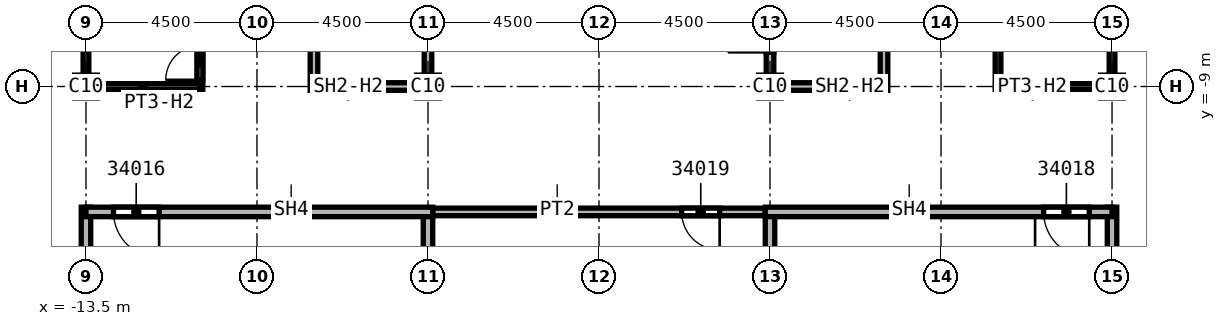
"""IFC4 building model, lengths in metres.
Left out: names, types, materials, properties, quantities, classifications, styles, units other than length and angle.
Written with IfcOpenShell. Run it as: python <this file> out.ifc"""

import sys

from ifc_helpers import new_model, si_unit, direction, frame, frame_2d, origin, origin_2d, place, context, subcontext, project, spatial, rectangle, extrude, element, fill, save


model = new_model("IFC4")
c1 = context("Model", 3, precision=1e-05, world=origin(), true_north=direction((0.0, 1.0)))
c2 = subcontext(c1, "Body", "Model", "MODEL_VIEW")
j1 = project(units=[si_unit("LENGTHUNIT", "METRE"), si_unit("PLANEANGLEUNIT", "RADIAN")], contexts=[c1])
p1 = place(None, origin())
s1 = spatial("IfcSite", under=j1, at=p1, CompositionType="ELEMENT")
p2 = place(p1, origin())
s2 = spatial("IfcBuilding", under=s1, at=p2, CompositionType="ELEMENT")
p3 = place(p2, frame((0.0, 0.0, 366.0)))
s3 = spatial("IfcBuildingStorey", under=s2, at=p3, CompositionType="ELEMENT", Elevation=366.0)
for number, where, z_axis, x_axis in (
    (1, (4.5, -9.0, 0.0), (0.0, 0.0, 1.0), (1.0, 0.0, 0.0)),
    (2, (13.5, -9.0, 0.0), (0.0, 0.0, 1.0), (1.0, 0.0, 0.0)),
    (3, (-4.5, -9.0, 0.0), (0.0, 0.0, 1.0), (1.0, 0.0, 0.0)),
    (4, (-13.5, -9.0, 0.0), (0.0, 0.0, 1.0), (1.0, 0.0, 0.0)),
):
    element("IfcColumn", number, at=place(p3, frame(where, z_axis=z_axis, x_axis=x_axis)), inside=s3, PredefinedType="COLUMN", context=c2, shape_type="SweptSolid", body=[
        extrude(rectangle(XDim=0.6, YDim=0.6, at=origin_2d()), origin(), (0.0, 0.0, 1.0), 9.6),
    ])
p4 = place(p3, frame((4.625, -12.3, 0.0), z_axis=(0.0, 0.0, 1.0), x_axis=(-1.0, 0.0, 0.0)))
e5 = element("IfcWall", 5, at=p4, inside=s3, PredefinedType="PARTITIONING", context=c2, shape_type="SweptSolid", body=[
    extrude(rectangle(XDim=9.25, YDim=0.2, at=frame_2d((4.625, 0.0))), origin(), (0.0, 0.0, 1.0), 9.15),
])
p5 = place(p4, frame((1.45, 0.0, 0.0)))
e6 = element("IfcOpeningElement", 6, at=p5, cuts=e5, PredefinedType="OPENING", context=c2, shape_type="SweptSolid", body=[
    extrude(rectangle(XDim=1.0, YDim=2.1, at=frame_2d((0.5, 1.05))), frame((0.0, 0.1, 0.0), z_axis=(0.0, -1.0, 0.0), x_axis=(1.0, 0.0, 0.0)), (0.0, 0.0, 1.0), 0.2),
])
p6 = place(p3, frame((-7.5, -9.1, 0.0), z_axis=(0.0, 0.0, 1.0), x_axis=(0.0, 1.0, 0.0)))
e7 = element("IfcWall", 7, at=p6, inside=s3, PredefinedType="SOLIDWALL", context=c2, shape_type="SweptSolid", body=[
    extrude(rectangle(XDim=6.225, YDim=0.2, at=frame_2d((3.113, 0.0))), origin(), (0.0, 0.0, 1.0), 9.15),
])
p7 = place(p3, frame((-4.5, -9.0, 0.0), z_axis=(0.0, 0.0, 1.0), x_axis=(-1.0, 0.0, 0.0)))
e8 = element("IfcWall", 8, at=p7, inside=s3, PredefinedType="SOLIDWALL", context=c2, shape_type="SweptSolid", body=[
    extrude(rectangle(XDim=3.0, YDim=0.2, at=frame_2d((1.5, 0.0))), origin(), (0.0, 0.0, 1.0), 8.754),
])
p8 = place(p3, frame((-4.5, 9.1, 0.0), z_axis=(0.0, 0.0, 1.0), x_axis=(0.0, -1.0, 0.0)))
e9 = element("IfcWall", 9, at=p8, inside=s3, PredefinedType="SOLIDWALL", context=c2, shape_type="SweptSolid", body=[
    extrude(rectangle(XDim=18.2, YDim=0.2, at=frame_2d((9.1, 0.0))), origin(), (0.0, 0.0, 1.0), 8.838),
])
p9 = place(p8, frame((15.35, 0.0, 0.0)))
e10 = element("IfcOpeningElement", 10, at=p9, cuts=e9, PredefinedType="OPENING", context=c2, shape_type="SweptSolid", body=[
    extrude(rectangle(XDim=1.1, YDim=2.1, at=frame_2d((0.55, 1.05))), frame((0.0, 0.1, 0.0), z_axis=(0.0, -1.0, 0.0), x_axis=(1.0, 0.0, 0.0)), (0.0, 0.0, 1.0), 0.2),
])
p10 = place(p8, frame((9.85, 0.0, 0.0)))
e11 = element("IfcOpeningElement", 11, at=p10, cuts=e9, PredefinedType="OPENING", context=c2, shape_type="SweptSolid", body=[
    extrude(rectangle(XDim=1.1, YDim=2.1, at=frame_2d((0.55, 1.05))), frame((0.0, 0.1, 0.0), z_axis=(0.0, -1.0, 0.0), x_axis=(1.0, 0.0, 0.0)), (0.0, 0.0, 1.0), 0.2),
])
p11 = place(p3, frame((4.5, -9.1, 0.0), z_axis=(0.0, 0.0, 1.0), x_axis=(0.0, 1.0, 0.0)))
e12 = element("IfcWall", 12, at=p11, inside=s3, PredefinedType="SOLIDWALL", context=c2, shape_type="SweptSolid", body=[
    extrude(rectangle(XDim=18.2, YDim=0.2, at=frame_2d((9.1, 0.0))), origin(), (0.0, 0.0, 1.0), 8.838),
])
p12 = place(p11, frame((1.0, 0.0, 0.0)))
e13 = element("IfcOpeningElement", 13, at=p12, cuts=e12, PredefinedType="OPENING", context=c2, shape_type="SweptSolid", body=[
    extrude(rectangle(XDim=1.1, YDim=2.1, at=frame_2d((0.55, 1.05))), frame((0.0, 0.1, 0.0), z_axis=(0.0, -1.0, 0.0), x_axis=(1.0, 0.0, 0.0)), (0.0, 0.0, 1.0), 0.2),
])
p13 = place(p11, frame((9.95, 0.0, 0.0)))
e14 = element("IfcOpeningElement", 14, at=p13, cuts=e12, PredefinedType="OPENING", context=c2, shape_type="SweptSolid", body=[
    extrude(rectangle(XDim=1.1, YDim=2.1, at=frame_2d((0.55, 1.05))), frame((0.0, 0.1, 0.0), z_axis=(0.0, -1.0, 0.0), x_axis=(1.0, 0.0, 0.0)), (0.0, 0.0, 1.0), 0.2),
])
p14 = place(p3, frame((7.5, -9.0, 0.0), z_axis=(0.0, 0.0, 1.0), x_axis=(-1.0, 0.0, 0.0)))
e15 = element("IfcWall", 15, at=p14, inside=s3, PredefinedType="SOLIDWALL", context=c2, shape_type="SweptSolid", body=[
    extrude(rectangle(XDim=3.0, YDim=0.2, at=frame_2d((1.5, 0.0))), origin(), (0.0, 0.0, 1.0), 8.754),
])
p15 = place(p3, frame((7.5, -2.875, 0.0), z_axis=(0.0, 0.0, 1.0), x_axis=(0.0, -1.0, 0.0)))
e16 = element("IfcWall", 16, at=p15, inside=s3, PredefinedType="SOLIDWALL", context=c2, shape_type="SweptSolid", body=[
    extrude(rectangle(XDim=6.225, YDim=0.2, at=frame_2d((3.113, 0.0))), origin(), (0.0, 0.0, 1.0), 9.15),
])
p16 = place(p3, frame((-13.5, -12.175, 0.0), z_axis=(0.0, 0.0, 1.0), x_axis=(0.0, -1.0, 0.0)))
e17 = element("IfcWall", 17, at=p16, inside=s3, PredefinedType="SOLIDWALL", context=c2, shape_type="SweptSolid", body=[
    extrude(rectangle(XDim=4.75, YDim=0.25, at=frame_2d((2.375, 0.0))), origin(), (0.0, 0.0, 1.0), 5.76),
])
p17 = place(p3, frame((-4.5, -12.3, 0.0), z_axis=(0.0, 0.0, 1.0), x_axis=(0.0, -1.0, 0.0)))
e18 = element("IfcWall", 18, at=p17, inside=s3, PredefinedType="SOLIDWALL", context=c2, shape_type="SweptSolid", body=[
    extrude(rectangle(XDim=4.625, YDim=0.25, at=frame_2d((2.312, 0.0))), origin(), (0.0, 0.0, 1.0), 9.744),
])
p18 = place(p3, frame((-4.375, -12.3, 0.0), z_axis=(0.0, 0.0, 1.0), x_axis=(-1.0, 0.0, 0.0)))
e19 = element("IfcWall", 19, at=p18, inside=s3, PredefinedType="SOLIDWALL", context=c2, shape_type="SweptSolid", body=[
    extrude(rectangle(XDim=9.125, YDim=0.25, at=frame_2d((4.562, 0.0))), origin(), (0.0, 0.0, 1.0), 9.15),
])
p19 = place(p18, frame((7.2, 0.0, 0.0)))
e20 = element("IfcOpeningElement", 20, at=p19, cuts=e19, PredefinedType="OPENING", context=c2, shape_type="SweptSolid", body=[
    extrude(rectangle(XDim=1.2, YDim=2.1, at=frame_2d((0.6, 1.05))), frame((0.0, 0.125, 0.0), z_axis=(0.0, -1.0, 0.0), x_axis=(1.0, 0.0, 0.0)), (0.0, 0.0, 1.0), 0.25),
])
p20 = place(p3, frame((4.5, -16.925, 0.0), z_axis=(0.0, 0.0, 1.0), x_axis=(0.0, 1.0, 0.0)))
e21 = element("IfcWall", 21, at=p20, inside=s3, PredefinedType="SOLIDWALL", context=c2, shape_type="SweptSolid", body=[
    extrude(rectangle(XDim=4.625, YDim=0.25, at=frame_2d((2.312, 0.0))), origin(), (0.0, 0.0, 1.0), 9.744),
])
p21 = place(p3, frame((13.5, -16.925, 0.0), z_axis=(0.0, 0.0, 1.0), x_axis=(0.0, 1.0, 0.0)))
e22 = element("IfcWall", 22, at=p21, inside=s3, PredefinedType="SOLIDWALL", context=c2, shape_type="SweptSolid", body=[
    extrude(rectangle(XDim=4.75, YDim=0.25, at=frame_2d((2.375, 0.0))), origin(), (0.0, 0.0, 1.0), 5.76),
])
p22 = place(p3, frame((13.5, -12.3, 0.0), z_axis=(0.0, 0.0, 1.0), x_axis=(-1.0, 0.0, 0.0)))
e23 = element("IfcWall", 23, at=p22, inside=s3, PredefinedType="SOLIDWALL", context=c2, shape_type="SweptSolid", body=[
    extrude(rectangle(XDim=9.125, YDim=0.25, at=frame_2d((4.562, 0.0))), origin(), (0.0, 0.0, 1.0), 9.15),
])
p23 = place(p22, frame((0.6, 0.0, 0.0)))
e24 = element("IfcOpeningElement", 24, at=p23, cuts=e23, PredefinedType="OPENING", context=c2, shape_type="SweptSolid", body=[
    extrude(rectangle(XDim=1.2, YDim=2.1, at=frame_2d((0.6, 1.05))), frame((0.0, 0.125, 0.0), z_axis=(0.0, -1.0, 0.0), x_axis=(1.0, 0.0, 0.0)), (0.0, 0.0, 1.0), 0.25),
])
p24 = place(p3, frame((-13.5, -9.075, 0.0), z_axis=(0.0, 0.0, 1.0), x_axis=(0.0, 1.0, 0.0)))
e25 = element("IfcWall", 25, at=p24, inside=s3, PredefinedType="PARTITIONING", context=c2, shape_type="SweptSolid", body=[
    extrude(rectangle(XDim=4.075, YDim=0.15, at=frame_2d((2.038, 0.0))), origin(), (0.0, 0.0, 1.0), 5.76),
])
p25 = place(p3, frame((-10.5, -9.075, 0.0), z_axis=(0.0, 0.0, 1.0), x_axis=(0.0, 1.0, 0.0)))
e26 = element("IfcWall", 26, at=p25, inside=s3, PredefinedType="PARTITIONING", context=c2, shape_type="SweptSolid", body=[
    extrude(rectangle(XDim=4.15, YDim=0.15, at=frame_2d((2.075, 0.0))), origin(), (0.0, 0.0, 1.0), 9.15),
])
p26 = place(p25, frame((0.25, 0.0, 0.0)))
e27 = element("IfcOpeningElement", 27, at=p26, cuts=e26, PredefinedType="OPENING", context=c2, shape_type="SweptSolid", body=[
    extrude(rectangle(XDim=0.9, YDim=2.1, at=frame_2d((0.45, 1.05))), frame((0.0, 0.075, 0.0), z_axis=(0.0, -1.0, 0.0), x_axis=(1.0, 0.0, 0.0)), (0.0, 0.0, 1.0), 0.15),
])
p27 = place(p3, frame((-10.5, -9.0, 0.0), z_axis=(0.0, 0.0, 1.0), x_axis=(-1.0, 0.0, 0.0)))
e28 = element("IfcWall", 28, at=p27, inside=s3, PredefinedType="PARTITIONING", context=c2, shape_type="SweptSolid", body=[
    extrude(rectangle(XDim=3.0, YDim=0.15, at=frame_2d((1.5, 0.0))), origin(), (0.0, 0.0, 1.0), 8.754),
])
p28 = place(p3, frame((10.5, -2.875, 0.0), z_axis=(0.0, 0.0, 1.0), x_axis=(0.0, -1.0, 0.0)))
e29 = element("IfcWall", 29, at=p28, inside=s3, PredefinedType="PARTITIONING", context=c2, shape_type="SweptSolid", body=[
    extrude(rectangle(XDim=6.2, YDim=0.15, at=frame_2d((3.1, 0.0))), origin(), (0.0, 0.0, 1.0), 9.15),
])
p29 = place(p28, frame((2.65, 0.0, 0.0)))
e30 = element("IfcOpeningElement", 30, at=p29, cuts=e29, PredefinedType="OPENING", context=c2, shape_type="SweptSolid", body=[
    extrude(rectangle(XDim=0.9, YDim=2.1, at=frame_2d((0.45, 1.05))), frame((0.0, 0.075, 0.0), z_axis=(0.0, -1.0, 0.0), x_axis=(1.0, 0.0, 0.0)), (0.0, 0.0, 1.0), 0.15),
])
p30 = place(p3, frame((13.5, -9.0, 0.0), z_axis=(0.0, 0.0, 1.0), x_axis=(-1.0, 0.0, 0.0)))
e31 = element("IfcWall", 31, at=p30, inside=s3, PredefinedType="PARTITIONING", context=c2, shape_type="SweptSolid", body=[
    extrude(rectangle(XDim=3.0, YDim=0.15, at=frame_2d((1.5, 0.0))), origin(), (0.0, 0.0, 1.0), 8.754),
])
p31 = place(p3, frame((13.5, -3.0, 0.0), z_axis=(0.0, 0.0, 1.0), x_axis=(0.0, -1.0, 0.0)))
e32 = element("IfcWall", 32, at=p31, inside=s3, PredefinedType="PARTITIONING", context=c2, shape_type="SweptSolid", body=[
    extrude(rectangle(XDim=6.075, YDim=0.15, at=frame_2d((3.038, 0.0))), origin(), (0.0, 0.0, 1.0), 5.76),
])
p32 = place(p26, origin())
e33 = element("IfcDoor", 33, at=p32, inside=s3, OperationType="SINGLE_SWING_RIGHT", PredefinedType="DOOR", context=c2, shape_type="SweptSolid", body=[
    extrude(rectangle(XDim=0.9, YDim=2.1, at=frame_2d((0.45, 1.05))), frame((0.0, 0.025, 0.0), z_axis=(0.0, -1.0, 0.0), x_axis=(1.0, 0.0, 0.0)), (0.0, 0.0, 1.0), 0.05),
])
fill(e27, e33)
p33 = place(p19, origin())
e34 = element("IfcDoor", 34, at=p33, inside=s3, OperationType="SINGLE_SWING_LEFT", PredefinedType="DOOR", context=c2, shape_type="SweptSolid", body=[
    extrude(rectangle(XDim=1.2, YDim=2.1, at=frame_2d((0.6, 1.05))), frame((0.0, 0.025, 0.0), z_axis=(0.0, -1.0, 0.0), x_axis=(1.0, 0.0, 0.0)), (0.0, 0.0, 1.0), 0.05),
])
fill(e20, e34)
p34 = place(p23, origin())
e35 = element("IfcDoor", 35, at=p34, inside=s3, OperationType="SINGLE_SWING_LEFT", PredefinedType="DOOR", context=c2, shape_type="SweptSolid", body=[
    extrude(rectangle(XDim=1.2, YDim=2.1, at=frame_2d((0.6, 1.05))), frame((0.0, 0.025, 0.0), z_axis=(0.0, -1.0, 0.0), x_axis=(1.0, 0.0, 0.0)), (0.0, 0.0, 1.0), 0.05),
])
fill(e24, e35)
p35 = place(p5, origin())
e36 = element("IfcDoor", 36, at=p35, inside=s3, OperationType="SINGLE_SWING_RIGHT", PredefinedType="DOOR", context=c2, shape_type="SweptSolid", body=[
    extrude(rectangle(XDim=1.0, YDim=2.1, at=frame_2d((0.5, 1.05))), frame((0.0, 0.025, 0.0), z_axis=(0.0, -1.0, 0.0), x_axis=(1.0, 0.0, 0.0)), (0.0, 0.0, 1.0), 0.05),
])
fill(e6, e36)
save(model, sys.argv[1])
